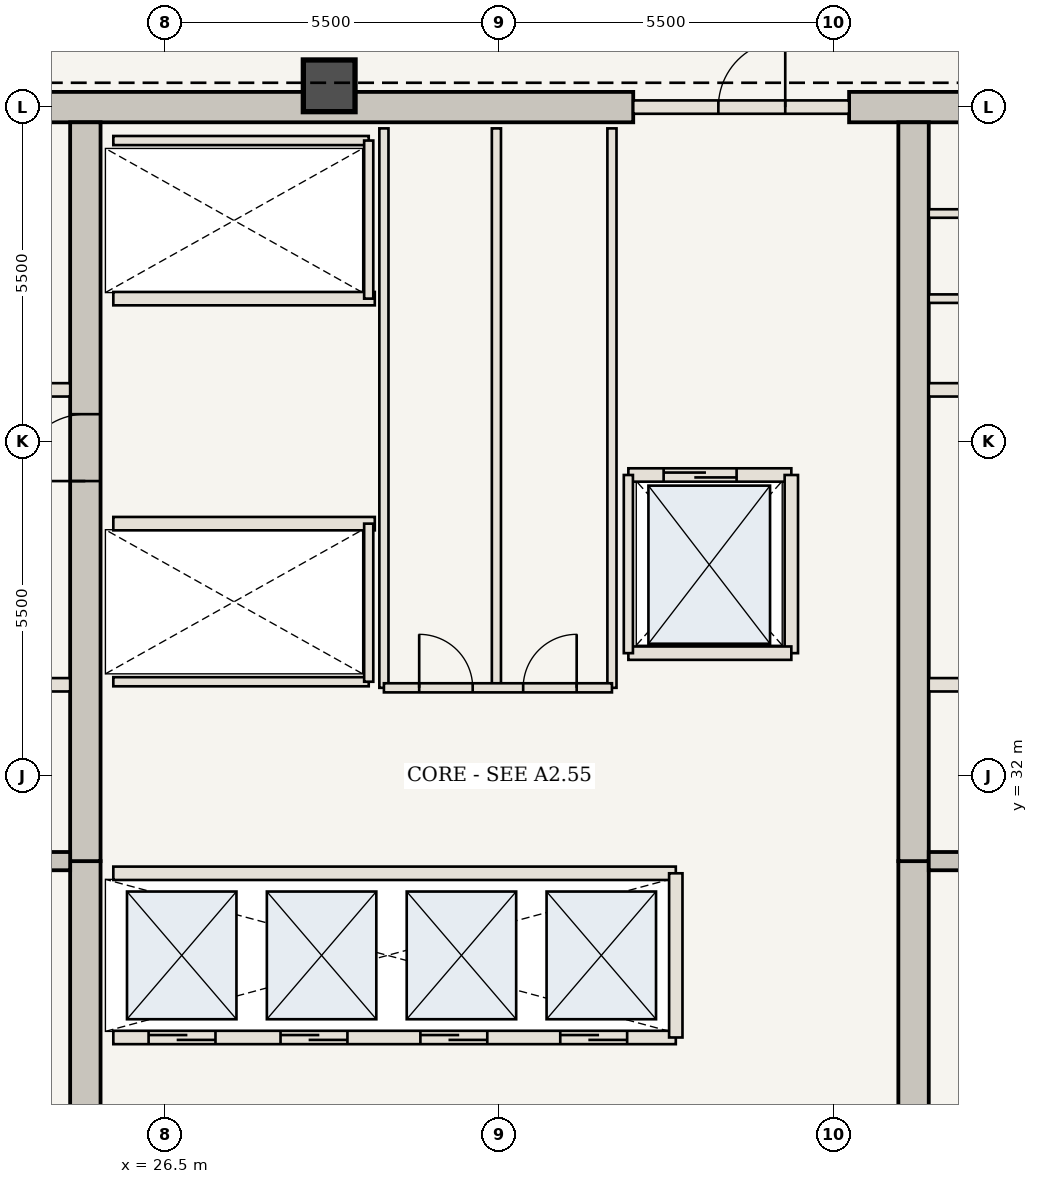
"""IFC4 building model, lengths in metres.
Left out: names, types, materials, properties, quantities, classifications, styles, units other than length and angle.
Written with IfcOpenShell. Run it as: python <this file> out.ifc"""

import sys

from ifc_helpers import new_model, si_unit, direction, frame, frame_2d, origin, origin_2d, place, context, subcontext, project, spatial, rectangle, extrude, element, fill, save


model = new_model("IFC4")
c1 = context("Model", 3, precision=1e-05, world=origin(), true_north=direction((0.0, 1.0)))
c2 = subcontext(c1, "Body", "Model", "MODEL_VIEW")
j1 = project(units=[si_unit("LENGTHUNIT", "METRE"), si_unit("PLANEANGLEUNIT", "RADIAN")], contexts=[c1])
p1 = place(None, origin())
s1 = spatial("IfcSite", under=j1, at=p1, CompositionType="ELEMENT")
p2 = place(p1, origin())
s2 = spatial("IfcBuilding", under=s1, at=p2, CompositionType="ELEMENT")
p3 = place(p2, frame((0.0, 0.0, 248.5)))
s3 = spatial("IfcBuildingStorey", under=s2, at=p3, CompositionType="ELEMENT", Elevation=248.5)
p4 = place(p3, frame((21.41, 43.0, 0.0), z_axis=(0.0, 0.0, 1.0), x_axis=(1.0, 0.0, 0.0)))
e1 = element("IfcWall", 1, at=p4, inside=s3, PredefinedType="SHEAR", context=c2, shape_type="SweptSolid", body=[
    extrude(rectangle(XDim=12.79, YDim=0.5, at=frame_2d((6.395, 0.0))), origin(), (0.0, 0.0, 1.0), 3.85),
])
p5 = place(p3, frame((37.75, 43.0, 0.0), z_axis=(0.0, 0.0, 1.0), x_axis=(1.0, 0.0, 0.0)))
e2 = element("IfcWall", 2, at=p5, inside=s3, PredefinedType="SHEAR", context=c2, shape_type="SweptSolid", body=[
    extrude(rectangle(XDim=4.84, YDim=0.5, at=frame_2d((2.42, 0.0))), origin(), (0.0, 0.0, 1.0), 3.85),
])
p6 = place(p3, frame((25.19, 21.2, 0.0), z_axis=(0.0, 0.0, 1.0), x_axis=(0.0, 1.0, 0.0)))
e3 = element("IfcWall", 3, at=p6, inside=s3, PredefinedType="SHEAR", context=c2, shape_type="SweptSolid", body=[
    extrude(rectangle(XDim=9.4, YDim=0.5, at=frame_2d((4.7, 0.0))), origin(), (0.0, 0.0, 1.0), 3.85),
])
p7 = place(p3, frame((25.19, 30.6, 0.0), z_axis=(0.0, 0.0, 1.0), x_axis=(0.0, 1.0, 0.0)))
e4 = element("IfcWall", 4, at=p7, inside=s3, PredefinedType="SHEAR", context=c2, shape_type="SweptSolid", body=[
    extrude(rectangle(XDim=12.15, YDim=0.5, at=frame_2d((6.075, 0.0))), origin(), (0.0, 0.0, 1.0), 3.85),
])
p8 = place(p7, frame((6.25, 0.0, 0.0)))
e5 = element("IfcOpeningElement", 5, at=p8, cuts=e4, PredefinedType="OPENING", context=c2, shape_type="SweptSolid", body=[
    extrude(rectangle(XDim=1.1, YDim=2.15, at=frame_2d((0.55, 1.075))), frame((0.0, 0.26, 0.0), z_axis=(0.0, -1.0, 0.0), x_axis=(1.0, 0.0, 0.0)), (0.0, 0.0, 1.0), 0.52),
])
p9 = place(p3, frame((38.81, 21.2, 0.0), z_axis=(0.0, 0.0, 1.0), x_axis=(0.0, 1.0, 0.0)))
e6 = element("IfcWall", 6, at=p9, inside=s3, PredefinedType="SHEAR", context=c2, shape_type="SweptSolid", body=[
    extrude(rectangle(XDim=9.4, YDim=0.5, at=frame_2d((4.7, 0.0))), origin(), (0.0, 0.0, 1.0), 3.85),
])
p10 = place(p3, frame((38.81, 30.6, 0.0), z_axis=(0.0, 0.0, 1.0), x_axis=(0.0, 1.0, 0.0)))
e7 = element("IfcWall", 7, at=p10, inside=s3, PredefinedType="SHEAR", context=c2, shape_type="SweptSolid", body=[
    extrude(rectangle(XDim=12.15, YDim=0.5, at=frame_2d((6.075, 0.0))), origin(), (0.0, 0.0, 1.0), 3.85),
])
p11 = place(p3, frame((29.2, 43.35, 0.0), z_axis=(0.0, 0.0, 1.0), x_axis=(1.0, 0.0, 0.0)))
e8 = element("IfcColumn", 8, at=p11, inside=s3, PredefinedType="COLUMN", context=c2, shape_type="SweptSolid", body=[
    extrude(rectangle(XDim=0.85, YDim=0.85, at=origin_2d()), origin(), (0.0, 0.0, 1.0), 3.85),
])
for number, where, z_axis, x_axis in (
    (9, (21.41, 30.6, 0.0), (0.0, 0.0, 1.0), (1.0, 0.0, 0.0)),
    (10, (39.06, 30.6, 0.0), (0.0, 0.0, 1.0), (1.0, 0.0, 0.0)),
):
    element("IfcWall", number, at=place(p3, frame(where, z_axis=z_axis, x_axis=x_axis)), inside=s3, PredefinedType="SHEAR", context=c2, shape_type="SweptSolid", body=[
        extrude(rectangle(XDim=3.53, YDim=0.3, at=frame_2d((1.765, 0.0))), origin(), (0.0, 0.0, 1.0), 3.43),
    ])
p12 = place(p3, frame((21.41, 33.5, 0.0), z_axis=(0.0, 0.0, 1.0), x_axis=(1.0, 0.0, 0.0)))
e11 = element("IfcWall", 11, at=p12, inside=s3, PredefinedType="STANDARD", context=c2, shape_type="SweptSolid", body=[
    extrude(rectangle(XDim=3.53, YDim=0.22, at=frame_2d((1.765, 0.0))), origin(), (0.0, 0.0, 1.0), 3.43),
])
p13 = place(p12, frame((0.75, 0.0, 0.0)))
e12 = element("IfcOpeningElement", 12, at=p13, cuts=e11, PredefinedType="OPENING", context=c2, shape_type="SweptSolid", body=[
    extrude(rectangle(XDim=1.2, YDim=2.2, at=frame_2d((0.6, 1.1))), frame((0.0, 0.12, 0.0), z_axis=(0.0, -1.0, 0.0), x_axis=(1.0, 0.0, 0.0)), (0.0, 0.0, 1.0), 0.24),
])
p14 = place(p3, frame((39.06, 33.5, 0.0), z_axis=(0.0, 0.0, 1.0), x_axis=(1.0, 0.0, 0.0)))
e13 = element("IfcWall", 13, at=p14, inside=s3, PredefinedType="STANDARD", context=c2, shape_type="SweptSolid", body=[
    extrude(rectangle(XDim=3.53, YDim=0.22, at=frame_2d((1.765, 0.0))), origin(), (0.0, 0.0, 1.0), 3.43),
])
p15 = place(p14, frame((1.55, 0.0, 0.0)))
e14 = element("IfcOpeningElement", 14, at=p15, cuts=e13, PredefinedType="OPENING", context=c2, shape_type="SweptSolid", body=[
    extrude(rectangle(XDim=1.2, YDim=2.2, at=frame_2d((0.6, 1.1))), frame((0.0, 0.12, 0.0), z_axis=(0.0, -1.0, 0.0), x_axis=(1.0, 0.0, 0.0)), (0.0, 0.0, 1.0), 0.24),
])
for number, where, z_axis, x_axis in (
    (15, (21.41, 38.35, 0.0), (0.0, 0.0, 1.0), (1.0, 0.0, 0.0)),
    (16, (39.06, 38.35, 0.0), (0.0, 0.0, 1.0), (1.0, 0.0, 0.0)),
):
    element("IfcWall", number, at=place(p3, frame(where, z_axis=z_axis, x_axis=x_axis)), inside=s3, PredefinedType="STANDARD", context=c2, shape_type="SweptSolid", body=[
        extrude(rectangle(XDim=3.53, YDim=0.22, at=frame_2d((1.765, 0.0))), origin(), (0.0, 0.0, 1.0), 3.43),
    ])
for number, where, z_axis, x_axis in (
    (17, (39.06, 39.85, 0.0), (0.0, 0.0, 1.0), (1.0, 0.0, 0.0)),
    (18, (39.06, 41.25, 0.0), (0.0, 0.0, 1.0), (1.0, 0.0, 0.0)),
):
    element("IfcWall", number, at=place(p3, frame(where, z_axis=z_axis, x_axis=x_axis)), inside=s3, PredefinedType="STANDARD", context=c2, shape_type="SweptSolid", body=[
        extrude(rectangle(XDim=3.53, YDim=0.14, at=frame_2d((1.765, 0.0))), origin(), (0.0, 0.0, 1.0), 3.43),
    ])
p16 = place(p3, frame((25.65, 27.7, 0.0), z_axis=(0.0, 0.0, 1.0), x_axis=(1.0, 0.0, 0.0)))
e19 = element("IfcWall", 19, at=p16, inside=s3, PredefinedType="STANDARD", context=c2, shape_type="SweptSolid", body=[
    extrude(rectangle(XDim=9.25, YDim=0.22, at=frame_2d((4.625, 0.0))), origin(), (0.0, 0.0, 1.0), 3.43),
])
p17 = place(p16, frame((0.58, 0.0, 0.0)))
e20 = element("IfcOpeningElement", 20, at=p17, cuts=e19, PredefinedType="OPENING", context=c2, shape_type="SweptSolid", body=[
    extrude(rectangle(XDim=1.1, YDim=2.15, at=frame_2d((0.55, 1.075))), frame((0.0, 0.12, 0.0), z_axis=(0.0, -1.0, 0.0), x_axis=(1.0, 0.0, 0.0)), (0.0, 0.0, 1.0), 0.24),
])
p18 = place(p16, frame((2.75, 0.0, 0.0)))
e21 = element("IfcOpeningElement", 21, at=p18, cuts=e19, PredefinedType="OPENING", context=c2, shape_type="SweptSolid", body=[
    extrude(rectangle(XDim=1.1, YDim=2.15, at=frame_2d((0.55, 1.075))), frame((0.0, 0.12, 0.0), z_axis=(0.0, -1.0, 0.0), x_axis=(1.0, 0.0, 0.0)), (0.0, 0.0, 1.0), 0.24),
])
p19 = place(p16, frame((5.05, 0.0, 0.0)))
e22 = element("IfcOpeningElement", 22, at=p19, cuts=e19, PredefinedType="OPENING", context=c2, shape_type="SweptSolid", body=[
    extrude(rectangle(XDim=1.1, YDim=2.15, at=frame_2d((0.55, 1.075))), frame((0.0, 0.12, 0.0), z_axis=(0.0, -1.0, 0.0), x_axis=(1.0, 0.0, 0.0)), (0.0, 0.0, 1.0), 0.24),
])
p20 = place(p16, frame((7.35, 0.0, 0.0)))
e23 = element("IfcOpeningElement", 23, at=p20, cuts=e19, PredefinedType="OPENING", context=c2, shape_type="SweptSolid", body=[
    extrude(rectangle(XDim=1.1, YDim=2.15, at=frame_2d((0.55, 1.075))), frame((0.0, 0.12, 0.0), z_axis=(0.0, -1.0, 0.0), x_axis=(1.0, 0.0, 0.0)), (0.0, 0.0, 1.0), 0.24),
])
p21 = place(p3, frame((25.65, 30.4, 0.0), z_axis=(0.0, 0.0, 1.0), x_axis=(1.0, 0.0, 0.0)))
e24 = element("IfcWall", 24, at=p21, inside=s3, PredefinedType="STANDARD", context=c2, shape_type="SweptSolid", body=[
    extrude(rectangle(XDim=9.25, YDim=0.22, at=frame_2d((4.625, 0.0))), origin(), (0.0, 0.0, 1.0), 3.43),
])
p22 = place(p3, frame((34.9, 27.7, 0.0), z_axis=(0.0, 0.0, 1.0), x_axis=(0.0, 1.0, 0.0)))
e25 = element("IfcWall", 25, at=p22, inside=s3, PredefinedType="STANDARD", context=c2, shape_type="SweptSolid", body=[
    extrude(rectangle(XDim=2.7, YDim=0.22, at=frame_2d((1.35, 0.0))), origin(), (0.0, 0.0, 1.0), 3.43),
])
p23 = place(p3, frame((25.65, 36.15, 0.0), z_axis=(0.0, 0.0, 1.0), x_axis=(1.0, 0.0, 0.0)))
e26 = element("IfcWall", 26, at=p23, inside=s3, PredefinedType="STANDARD", context=c2, shape_type="SweptSolid", body=[
    extrude(rectangle(XDim=4.3, YDim=0.22, at=frame_2d((2.15, 0.0))), origin(), (0.0, 0.0, 1.0), 3.43),
])
p24 = place(p3, frame((25.65, 33.55, 0.0), z_axis=(0.0, 0.0, 1.0), x_axis=(1.0, 0.0, 0.0)))
e27 = element("IfcWall", 27, at=p24, inside=s3, PredefinedType="STANDARD", context=c2, shape_type="SweptSolid", body=[
    extrude(rectangle(XDim=4.2, YDim=0.15, at=frame_2d((2.1, 0.0))), origin(), (0.0, 0.0, 1.0), 3.43),
])
p25 = place(p3, frame((29.85, 33.55, 0.0), z_axis=(0.0, 0.0, 1.0), x_axis=(0.0, 1.0, 0.0)))
e28 = element("IfcWall", 28, at=p25, inside=s3, PredefinedType="STANDARD", context=c2, shape_type="SweptSolid", body=[
    extrude(rectangle(XDim=2.6, YDim=0.15, at=frame_2d((1.3, 0.0))), origin(), (0.0, 0.0, 1.0), 3.43),
])
p26 = place(p3, frame((25.65, 39.85, 0.0), z_axis=(0.0, 0.0, 1.0), x_axis=(1.0, 0.0, 0.0)))
e29 = element("IfcWall", 29, at=p26, inside=s3, PredefinedType="STANDARD", context=c2, shape_type="SweptSolid", body=[
    extrude(rectangle(XDim=4.3, YDim=0.22, at=frame_2d((2.15, 0.0))), origin(), (0.0, 0.0, 1.0), 3.43),
])
p27 = place(p3, frame((25.65, 42.45, 0.0), z_axis=(0.0, 0.0, 1.0), x_axis=(1.0, 0.0, 0.0)))
e30 = element("IfcWall", 30, at=p27, inside=s3, PredefinedType="STANDARD", context=c2, shape_type="SweptSolid", body=[
    extrude(rectangle(XDim=4.2, YDim=0.15, at=frame_2d((2.1, 0.0))), origin(), (0.0, 0.0, 1.0), 3.43),
])
p28 = place(p3, frame((29.85, 39.85, 0.0), z_axis=(0.0, 0.0, 1.0), x_axis=(0.0, 1.0, 0.0)))
e31 = element("IfcWall", 31, at=p28, inside=s3, PredefinedType="STANDARD", context=c2, shape_type="SweptSolid", body=[
    extrude(rectangle(XDim=2.6, YDim=0.15, at=frame_2d((1.3, 0.0))), origin(), (0.0, 0.0, 1.0), 3.43),
])
for number, where, z_axis, x_axis in (
    (32, (30.1, 33.45, 0.0), (0.0, 0.0, 1.0), (0.0, 1.0, 0.0)),
    (33, (31.95, 33.45, 0.0), (0.0, 0.0, 1.0), (0.0, 1.0, 0.0)),
    (34, (33.85, 33.45, 0.0), (0.0, 0.0, 1.0), (0.0, 1.0, 0.0)),
):
    element("IfcWall", number, at=place(p3, frame(where, z_axis=z_axis, x_axis=x_axis)), inside=s3, PredefinedType="STANDARD", context=c2, shape_type="SweptSolid", body=[
        extrude(rectangle(XDim=9.2, YDim=0.15, at=frame_2d((4.6, 0.0))), origin(), (0.0, 0.0, 1.0), 3.43),
    ])
p29 = place(p3, frame((30.1, 33.45, 0.0), z_axis=(0.0, 0.0, 1.0), x_axis=(1.0, 0.0, 0.0)))
e35 = element("IfcWall", 35, at=p29, inside=s3, PredefinedType="STANDARD", context=c2, shape_type="SweptSolid", body=[
    extrude(rectangle(XDim=3.75, YDim=0.15, at=frame_2d((1.875, 0.0))), origin(), (0.0, 0.0, 1.0), 3.43),
])
p30 = place(p29, frame((0.58, 0.0, 0.0)))
e36 = element("IfcOpeningElement", 36, at=p30, cuts=e35, PredefinedType="OPENING", context=c2, shape_type="SweptSolid", body=[
    extrude(rectangle(XDim=0.88, YDim=2.1, at=frame_2d((0.44, 1.05))), frame((0.0, 0.085, 0.0), z_axis=(0.0, -1.0, 0.0), x_axis=(1.0, 0.0, 0.0)), (0.0, 0.0, 1.0), 0.17),
])
p31 = place(p29, frame((2.29, 0.0, 0.0)))
e37 = element("IfcOpeningElement", 37, at=p31, cuts=e35, PredefinedType="OPENING", context=c2, shape_type="SweptSolid", body=[
    extrude(rectangle(XDim=0.88, YDim=2.1, at=frame_2d((0.44, 1.05))), frame((0.0, 0.085, 0.0), z_axis=(0.0, -1.0, 0.0), x_axis=(1.0, 0.0, 0.0)), (0.0, 0.0, 1.0), 0.17),
])
p32 = place(p3, frame((34.2, 43.0, 0.0), z_axis=(0.0, 0.0, 1.0), x_axis=(1.0, 0.0, 0.0)))
e38 = element("IfcWall", 38, at=p32, inside=s3, PredefinedType="STANDARD", context=c2, shape_type="SweptSolid", body=[
    extrude(rectangle(XDim=3.55, YDim=0.22, at=frame_2d((1.775, 0.0))), origin(), (0.0, 0.0, 1.0), 3.43),
])
p33 = place(p32, frame((1.4, 0.0, 0.0)))
e39 = element("IfcOpeningElement", 39, at=p33, cuts=e38, PredefinedType="OPENING", context=c2, shape_type="SweptSolid", body=[
    extrude(rectangle(XDim=1.1, YDim=2.15, at=frame_2d((0.55, 1.075))), frame((0.0, 0.12, 0.0), z_axis=(0.0, -1.0, 0.0), x_axis=(1.0, 0.0, 0.0)), (0.0, 0.0, 1.0), 0.24),
])
p34 = place(p3, frame((34.12, 36.95, 0.0), z_axis=(0.0, 0.0, 1.0), x_axis=(1.0, 0.0, 0.0)))
e40 = element("IfcWall", 40, at=p34, inside=s3, PredefinedType="STANDARD", context=c2, shape_type="SweptSolid", body=[
    extrude(rectangle(XDim=2.68, YDim=0.22, at=frame_2d((1.34, 0.0))), origin(), (0.0, 0.0, 1.0), 3.43),
])
p35 = place(p34, frame((0.58, 0.0, 0.0)))
e41 = element("IfcOpeningElement", 41, at=p35, cuts=e40, PredefinedType="OPENING", context=c2, shape_type="SweptSolid", body=[
    extrude(rectangle(XDim=1.2, YDim=2.2, at=frame_2d((0.6, 1.1))), frame((0.0, 0.12, 0.0), z_axis=(0.0, -1.0, 0.0), x_axis=(1.0, 0.0, 0.0)), (0.0, 0.0, 1.0), 0.24),
])
p36 = place(p3, frame((36.8, 34.02, 0.0), z_axis=(0.0, 0.0, 1.0), x_axis=(0.0, 1.0, 0.0)))
e42 = element("IfcWall", 42, at=p36, inside=s3, PredefinedType="STANDARD", context=c2, shape_type="SweptSolid", body=[
    extrude(rectangle(XDim=2.93, YDim=0.22, at=frame_2d((1.465, 0.0))), origin(), (0.0, 0.0, 1.0), 3.43),
])
p37 = place(p3, frame((34.12, 34.02, 0.0), z_axis=(0.0, 0.0, 1.0), x_axis=(1.0, 0.0, 0.0)))
e43 = element("IfcWall", 43, at=p37, inside=s3, PredefinedType="STANDARD", context=c2, shape_type="SweptSolid", body=[
    extrude(rectangle(XDim=2.68, YDim=0.22, at=frame_2d((1.34, 0.0))), origin(), (0.0, 0.0, 1.0), 3.43),
])
p38 = place(p3, frame((34.12, 34.02, 0.0), z_axis=(0.0, 0.0, 1.0), x_axis=(0.0, 1.0, 0.0)))
e44 = element("IfcWall", 44, at=p38, inside=s3, PredefinedType="STANDARD", context=c2, shape_type="SweptSolid", body=[
    extrude(rectangle(XDim=2.93, YDim=0.15, at=frame_2d((1.465, 0.0))), origin(), (0.0, 0.0, 1.0), 3.43),
])
p39 = place(p8, origin())
e45 = element("IfcDoor", 45, at=p39, inside=s3, OperationType="SINGLE_SWING_LEFT", PredefinedType="DOOR", context=c2, shape_type="SweptSolid", body=[
    extrude(rectangle(XDim=1.1, YDim=2.15, at=frame_2d((0.55, 1.075))), frame((0.0, 0.025, 0.0), z_axis=(0.0, -1.0, 0.0), x_axis=(1.0, 0.0, 0.0)), (0.0, 0.0, 1.0), 0.05),
])
fill(e5, e45)
p40 = place(p17, origin())
e46 = element("IfcDoor", 46, at=p40, inside=s3, OperationType="DOUBLE_DOOR_SLIDING", PredefinedType="DOOR", context=c2, shape_type="SweptSolid", body=[
    extrude(rectangle(XDim=1.1, YDim=2.15, at=frame_2d((0.55, 1.075))), frame((0.0, 0.025, 0.0), z_axis=(0.0, -1.0, 0.0), x_axis=(1.0, 0.0, 0.0)), (0.0, 0.0, 1.0), 0.05),
])
fill(e20, e46)
p41 = place(p18, origin())
e47 = element("IfcDoor", 47, at=p41, inside=s3, OperationType="DOUBLE_DOOR_SLIDING", PredefinedType="DOOR", context=c2, shape_type="SweptSolid", body=[
    extrude(rectangle(XDim=1.1, YDim=2.15, at=frame_2d((0.55, 1.075))), frame((0.0, 0.025, 0.0), z_axis=(0.0, -1.0, 0.0), x_axis=(1.0, 0.0, 0.0)), (0.0, 0.0, 1.0), 0.05),
])
fill(e21, e47)
p42 = place(p19, origin())
e48 = element("IfcDoor", 48, at=p42, inside=s3, OperationType="DOUBLE_DOOR_SLIDING", PredefinedType="DOOR", context=c2, shape_type="SweptSolid", body=[
    extrude(rectangle(XDim=1.1, YDim=2.15, at=frame_2d((0.55, 1.075))), frame((0.0, 0.025, 0.0), z_axis=(0.0, -1.0, 0.0), x_axis=(1.0, 0.0, 0.0)), (0.0, 0.0, 1.0), 0.05),
])
fill(e22, e48)
p43 = place(p20, origin())
e49 = element("IfcDoor", 49, at=p43, inside=s3, OperationType="DOUBLE_DOOR_SLIDING", PredefinedType="DOOR", context=c2, shape_type="SweptSolid", body=[
    extrude(rectangle(XDim=1.1, YDim=2.15, at=frame_2d((0.55, 1.075))), frame((0.0, 0.025, 0.0), z_axis=(0.0, -1.0, 0.0), x_axis=(1.0, 0.0, 0.0)), (0.0, 0.0, 1.0), 0.05),
])
fill(e23, e49)
p44 = place(p30, origin())
e50 = element("IfcDoor", 50, at=p44, inside=s3, OperationType="SINGLE_SWING_LEFT", PredefinedType="DOOR", context=c2, shape_type="SweptSolid", body=[
    extrude(rectangle(XDim=0.88, YDim=2.1, at=frame_2d((0.44, 1.05))), frame((0.0, 0.025, 0.0), z_axis=(0.0, -1.0, 0.0), x_axis=(1.0, 0.0, 0.0)), (0.0, 0.0, 1.0), 0.05),
])
fill(e36, e50)
p45 = place(p31, origin())
e51 = element("IfcDoor", 51, at=p45, inside=s3, OperationType="SINGLE_SWING_RIGHT", PredefinedType="DOOR", context=c2, shape_type="SweptSolid", body=[
    extrude(rectangle(XDim=0.88, YDim=2.1, at=frame_2d((0.44, 1.05))), frame((0.0, 0.025, 0.0), z_axis=(0.0, -1.0, 0.0), x_axis=(1.0, 0.0, 0.0)), (0.0, 0.0, 1.0), 0.05),
])
fill(e37, e51)
p46 = place(p33, origin())
e52 = element("IfcDoor", 52, at=p46, inside=s3, OperationType="SINGLE_SWING_RIGHT", PredefinedType="DOOR", context=c2, shape_type="SweptSolid", body=[
    extrude(rectangle(XDim=1.1, YDim=2.15, at=frame_2d((0.55, 1.075))), frame((0.0, 0.025, 0.0), z_axis=(0.0, -1.0, 0.0), x_axis=(1.0, 0.0, 0.0)), (0.0, 0.0, 1.0), 0.05),
])
fill(e39, e52)
p47 = place(p35, origin())
e53 = element("IfcDoor", 53, at=p47, inside=s3, OperationType="DOUBLE_DOOR_SLIDING", PredefinedType="DOOR", context=c2, shape_type="SweptSolid", body=[
    extrude(rectangle(XDim=1.2, YDim=2.2, at=frame_2d((0.6, 1.1))), frame((0.0, 0.025, 0.0), z_axis=(0.0, -1.0, 0.0), x_axis=(1.0, 0.0, 0.0)), (0.0, 0.0, 1.0), 0.05),
])
fill(e41, e53)
save(model, sys.argv[1])
